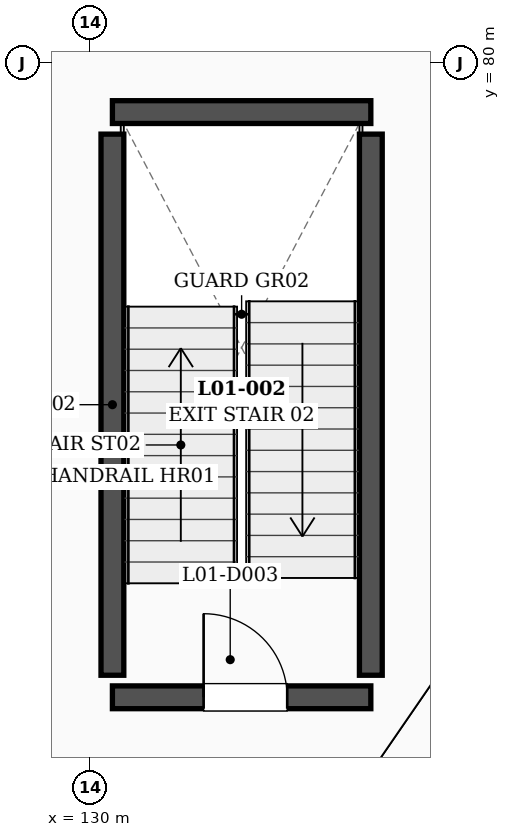
"""IFC4 building model, lengths in metres.
Left out: names, types, materials, properties, quantities, classifications, styles, units other than length and angle.
Written with IfcOpenShell. Run it as: python <this file> out.ifc"""

import sys

from ifc_helpers import new_model, si_unit, direction, frame, frame_2d, origin, place, context, subcontext, project, spatial, rectangle, extrude, element, fill, save


model = new_model("IFC4")
c1 = context("Model", 3, precision=1e-05, world=origin(), true_north=direction((0.0, 1.0)))
c2 = subcontext(c1, "Body", "Model", "MODEL_VIEW")
j1 = project(units=[si_unit("LENGTHUNIT", "METRE"), si_unit("PLANEANGLEUNIT", "RADIAN")], contexts=[c1])
p1 = place(None, origin())
s1 = spatial("IfcSite", under=j1, at=p1, CompositionType="ELEMENT")
p2 = place(p1, origin())
s2 = spatial("IfcBuilding", under=s1, at=p2, CompositionType="ELEMENT")
p3 = place(p2, frame((0.0, 0.0, 6.0)))
s3 = spatial("IfcBuildingStorey", under=s2, at=p3, CompositionType="ELEMENT", Elevation=6.0)
p4 = place(p3, frame((139.322, 79.303, 0.0), z_axis=(0.0, 0.0, 1.0), x_axis=(-0.95182847269, 0.30663098111, 0.0)))
e1 = element("IfcWall", 1, at=p4, inside=s3, PredefinedType="SOLIDWALL", context=c2, shape_type="SweptSolid", body=[
    extrude(rectangle(XDim=9.785, YDim=0.32, at=frame_2d((4.893, 0.0))), origin(), (0.0, 0.0, 1.0), 3.61),
])
p5 = place(p4, frame((0.95, 0.0, 0.95)))
e2 = element("IfcOpeningElement", 2, at=p5, cuts=e1, PredefinedType="OPENING", context=c2, shape_type="SweptSolid", body=[
    extrude(rectangle(XDim=2.4, YDim=2.1, at=frame_2d((1.2, 1.05))), frame((0.0, 0.17, 0.0), z_axis=(0.0, -1.0, 0.0), x_axis=(1.0, 0.0, 0.0)), (0.0, 0.0, 1.0), 0.34),
])
p6 = place(p4, frame((6.435, 0.0, 0.95)))
e3 = element("IfcOpeningElement", 3, at=p6, cuts=e1, PredefinedType="OPENING", context=c2, shape_type="SweptSolid", body=[
    extrude(rectangle(XDim=2.4, YDim=2.1, at=frame_2d((1.2, 1.05))), frame((0.0, 0.17, 0.0), z_axis=(0.0, -1.0, 0.0), x_axis=(1.0, 0.0, 0.0)), (0.0, 0.0, 1.0), 0.34),
])
p7 = place(p3, frame((130.3, 71.65, 0.0), z_axis=(0.0, 0.0, 1.0), x_axis=(1.0, 0.0, 0.0)))
e4 = element("IfcWall", 4, at=p7, inside=s3, PredefinedType="SHEAR", context=c2, shape_type="SweptSolid", body=[
    extrude(rectangle(XDim=3.4, YDim=0.3, at=frame_2d((1.7, 0.0))), origin(), (0.0, 0.0, 1.0), 4.8),
])
p8 = place(p7, frame((1.2, 0.0, 0.0)))
e5 = element("IfcOpeningElement", 5, at=p8, cuts=e4, PredefinedType="OPENING", context=c2, shape_type="SweptSolid", body=[
    extrude(rectangle(XDim=1.1, YDim=2.2, at=frame_2d((0.55, 1.1))), frame((0.0, 0.16, 0.0), z_axis=(0.0, -1.0, 0.0), x_axis=(1.0, 0.0, 0.0)), (0.0, 0.0, 1.0), 0.32),
])
p9 = place(p3, frame((130.3, 79.35, 0.0), z_axis=(0.0, 0.0, 1.0), x_axis=(1.0, 0.0, 0.0)))
e6 = element("IfcWall", 6, at=p9, inside=s3, PredefinedType="SHEAR", context=c2, shape_type="SweptSolid", body=[
    extrude(rectangle(XDim=3.4, YDim=0.3, at=frame_2d((1.7, 0.0))), origin(), (0.0, 0.0, 1.0), 4.8),
])
for number, where, z_axis, x_axis in (
    (7, (130.3, 71.94, 0.0), (0.0, 0.0, 1.0), (0.0, 1.0, 0.0)),
    (8, (133.7, 71.94, 0.0), (0.0, 0.0, 1.0), (0.0, 1.0, 0.0)),
):
    element("IfcWall", number, at=place(p3, frame(where, z_axis=z_axis, x_axis=x_axis)), inside=s3, PredefinedType="SHEAR", context=c2, shape_type="SweptSolid", body=[
        extrude(rectangle(XDim=7.12, YDim=0.3, at=frame_2d((3.56, 0.0))), origin(), (0.0, 0.0, 1.0), 4.8),
    ])
p10 = place(p3, frame((126.952, 74.437, 0.0), z_axis=(0.0, 0.0, 1.0), x_axis=(0.363286022187, 0.931677662115, 0.0)))
e9 = element("IfcWall", 9, at=p10, inside=s3, PredefinedType="PARTITIONING", context=c2, shape_type="SweptSolid", body=[
    extrude(rectangle(XDim=7.939, YDim=0.21, at=frame_2d((3.97, 0.0))), origin(), (0.0, 0.0, 1.0), 3.56),
])
p11 = place(p3, frame((125.564, 70.939, 0.0), z_axis=(0.0, 0.0, 1.0), x_axis=(0.951796024848, -0.306731685815, 0.0)))
e10 = element("IfcWall", 10, at=p11, inside=s3, PredefinedType="PARTITIONING", context=c2, shape_type="SweptSolid", body=[
    extrude(rectangle(XDim=7.0, YDim=0.14, at=frame_2d((3.5, 0.0))), origin(), (0.0, 0.0, 1.0), 3.56),
])
p12 = place(p8, origin())
e11 = element("IfcDoor", 11, at=p12, inside=s3, OperationType="SINGLE_SWING_LEFT", PredefinedType="DOOR", context=c2, shape_type="SweptSolid", body=[
    extrude(rectangle(XDim=1.1, YDim=2.2, at=frame_2d((0.55, 1.1))), frame((0.0, 0.025, 0.0), z_axis=(0.0, -1.0, 0.0), x_axis=(1.0, 0.0, 0.0)), (0.0, 0.0, 1.0), 0.05),
])
fill(e5, e11)
save(model, sys.argv[1])
